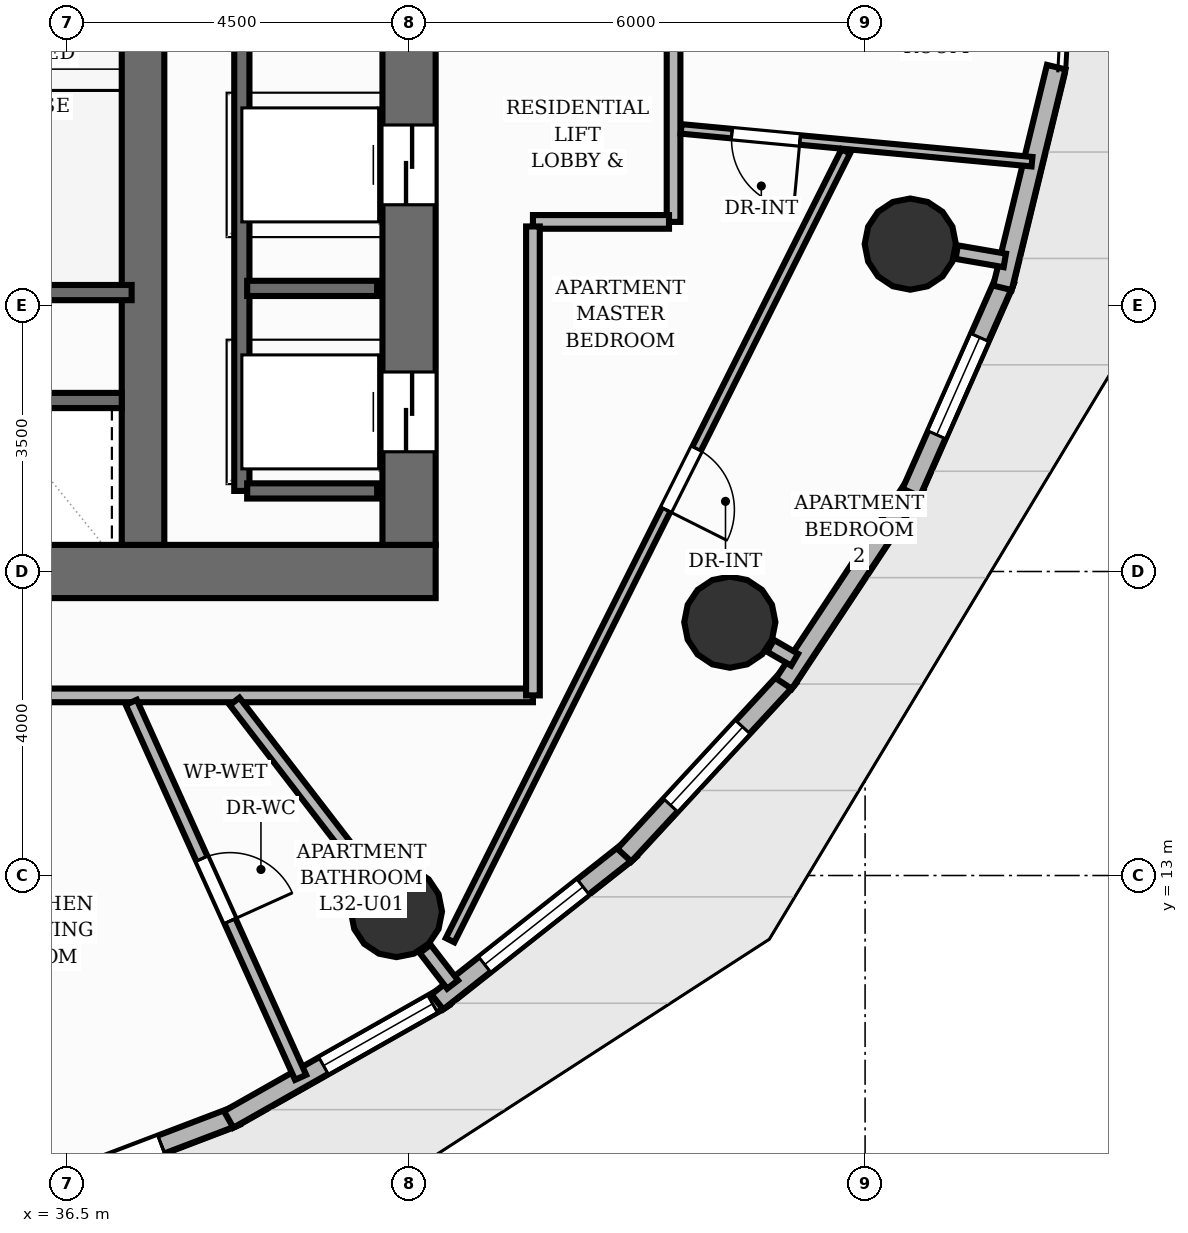
"""IFC4 building model, lengths in metres.
Left out: names, types, materials, properties, quantities, classifications, styles, units other than length and angle.
Written with IfcOpenShell. Run it as: python <this file> out.ifc"""

import sys

from ifc_helpers import new_model, si_unit, direction, frame, frame_2d, origin, origin_2d, place, context, subcontext, project, spatial, rectangle, circle, extrude, element, fill, save


model = new_model("IFC4")
c1 = context("Model", 3, precision=1e-05, world=origin(), true_north=direction((0.0, 1.0)))
c2 = subcontext(c1, "Body", "Model", "MODEL_VIEW")
j1 = project(units=[si_unit("LENGTHUNIT", "METRE"), si_unit("PLANEANGLEUNIT", "RADIAN")], contexts=[c1])
p1 = place(None, origin())
s1 = spatial("IfcSite", under=j1, at=p1, CompositionType="ELEMENT")
p2 = place(p1, origin())
s2 = spatial("IfcBuilding", under=s1, at=p2, CompositionType="ELEMENT")
p3 = place(p2, frame((0.0, 0.0, 109.28)))
s3 = spatial("IfcBuildingStorey", under=s2, at=p3, CompositionType="ELEMENT", Elevation=109.28)
p4 = place(p3, frame((22.65, 17.0, 0.0), z_axis=(0.0, 0.0, 1.0), x_axis=(1.0, 0.0, 0.0)))
e1 = element("IfcWall", 1, at=p4, inside=s3, PredefinedType="SHEAR", context=c2, shape_type="SweptSolid", body=[
    extrude(rectangle(XDim=18.7, YDim=0.7, at=frame_2d((9.35, 0.0))), origin(), (0.0, 0.0, 1.0), 3.2),
])
p5 = place(p4, frame((5.85, 0.0, 0.0)))
e2 = element("IfcOpeningElement", 2, at=p5, cuts=e1, PredefinedType="OPENING", context=c2, shape_type="SweptSolid", body=[
    extrude(rectangle(XDim=1.1, YDim=2.15, at=frame_2d((0.55, 1.075))), frame((0.0, 0.36, 0.0), z_axis=(0.0, -1.0, 0.0), x_axis=(1.0, 0.0, 0.0)), (0.0, 0.0, 1.0), 0.72),
])
p6 = place(p4, frame((9.4, 0.0, 0.0)))
e3 = element("IfcOpeningElement", 3, at=p6, cuts=e1, PredefinedType="OPENING", context=c2, shape_type="SweptSolid", body=[
    extrude(rectangle(XDim=0.9, YDim=2.0, at=frame_2d((0.45, 1.0))), frame((0.0, 0.36, 0.0), z_axis=(0.0, -1.0, 0.0), x_axis=(1.0, 0.0, 0.0)), (0.0, 0.0, 1.0), 0.72),
])
p7 = place(p3, frame((41.0, 17.35, 0.0), z_axis=(0.0, 0.0, 1.0), x_axis=(0.0, 1.0, 0.0)))
e4 = element("IfcWall", 4, at=p7, inside=s3, PredefinedType="SHEAR", context=c2, shape_type="SweptSolid", body=[
    extrude(rectangle(XDim=13.3, YDim=0.7, at=frame_2d((6.65, 0.0))), origin(), (0.0, 0.0, 1.0), 3.2),
])
p8 = place(p7, frame((1.225, 0.0, 0.0)))
e5 = element("IfcOpeningElement", 5, at=p8, cuts=e4, PredefinedType="OPENING", context=c2, shape_type="SweptSolid", body=[
    extrude(rectangle(XDim=1.05, YDim=2.0, at=frame_2d((0.525, 1.0))), frame((0.0, 0.36, 0.0), z_axis=(0.0, -1.0, 0.0), x_axis=(1.0, 0.0, 0.0)), (0.0, 0.0, 1.0), 0.72),
])
p9 = place(p7, frame((4.475, 0.0, 0.0)))
e6 = element("IfcOpeningElement", 6, at=p9, cuts=e4, PredefinedType="OPENING", context=c2, shape_type="SweptSolid", body=[
    extrude(rectangle(XDim=1.05, YDim=2.0, at=frame_2d((0.525, 1.0))), frame((0.0, 0.36, 0.0), z_axis=(0.0, -1.0, 0.0), x_axis=(1.0, 0.0, 0.0)), (0.0, 0.0, 1.0), 0.72),
])
p10 = place(p7, frame((7.775, 0.0, 0.0)))
e7 = element("IfcOpeningElement", 7, at=p10, cuts=e4, PredefinedType="OPENING", context=c2, shape_type="SweptSolid", body=[
    extrude(rectangle(XDim=1.05, YDim=2.0, at=frame_2d((0.525, 1.0))), frame((0.0, 0.36, 0.0), z_axis=(0.0, -1.0, 0.0), x_axis=(1.0, 0.0, 0.0)), (0.0, 0.0, 1.0), 0.72),
])
p11 = place(p7, frame((11.025, 0.0, 0.0)))
e8 = element("IfcOpeningElement", 8, at=p11, cuts=e4, PredefinedType="OPENING", context=c2, shape_type="SweptSolid", body=[
    extrude(rectangle(XDim=1.05, YDim=2.0, at=frame_2d((0.525, 1.0))), frame((0.0, 0.36, 0.0), z_axis=(0.0, -1.0, 0.0), x_axis=(1.0, 0.0, 0.0)), (0.0, 0.0, 1.0), 0.72),
])
p12 = place(p3, frame((37.5, 17.35, 0.0), z_axis=(0.0, 0.0, 1.0), x_axis=(0.0, 1.0, 0.0)))
e9 = element("IfcWall", 9, at=p12, inside=s3, PredefinedType="SHEAR", context=c2, shape_type="SweptSolid", body=[
    extrude(rectangle(XDim=13.3, YDim=0.56, at=frame_2d((6.65, 0.0))), origin(), (0.0, 0.0, 1.0), 3.2),
])
for number, where, z_axis, x_axis in (
    (10, (40.833, 12.526, 0.0), (0.0, 0.0, 1.0), (1.0, 0.0, 0.0)),
    (11, (45.22, 16.333, 0.0), (0.0, 0.0, 1.0), (1.0, 0.0, 0.0)),
    (12, (47.594, 21.308, 0.0), (0.0, 0.0, 1.0), (1.0, 0.0, 0.0)),
):
    element("IfcColumn", number, at=place(p3, frame(where, z_axis=z_axis, x_axis=x_axis)), inside=s3, PredefinedType="COLUMN", context=c2, shape_type="SweptSolid", body=[
        extrude(circle(Radius=0.6, at=origin_2d()), origin(), (0.0, 0.0, 1.0), 3.2),
    ])
p13 = place(p3, frame((38.725, 9.836, 0.0), z_axis=(0.0, 0.0, 1.0), x_axis=(-0.934481801939, -0.3560109013, 0.0)))
e13 = element("IfcWall", 13, at=p13, inside=s3, PredefinedType="SOLIDWALL", context=c2, shape_type="SweptSolid", body=[
    extrude(rectangle(XDim=3.26, YDim=0.25, at=frame_2d((1.63, 0.0))), origin(), (0.0, 0.0, 1.0), 2.8),
])
p14 = place(p13, frame((1.055, 0.0, 0.0)))
e14 = element("IfcOpeningElement", 14, at=p14, cuts=e13, PredefinedType="OPENING", context=c2, shape_type="SweptSolid", body=[
    extrude(rectangle(XDim=1.15, YDim=2.01, at=frame_2d((0.575, 1.005))), frame((0.0, 0.135, 0.0), z_axis=(0.0, -1.0, 0.0), x_axis=(1.0, 0.0, 0.0)), (0.0, 0.0, 1.0), 0.27),
])
p15 = place(p3, frame((41.462, 11.397, 0.0), z_axis=(0.0, 0.0, 1.0), x_axis=(-0.869984700924, -0.493078715986, 0.0)))
e15 = element("IfcWall", 15, at=p15, inside=s3, PredefinedType="SOLIDWALL", context=c2, shape_type="SweptSolid", body=[
    extrude(rectangle(XDim=3.26, YDim=0.25, at=frame_2d((1.63, 0.0))), origin(), (0.0, 0.0, 1.0), 2.8),
])
p16 = place(p15, frame((0.175, 0.0, 0.85)))
e16 = element("IfcOpeningElement", 16, at=p16, cuts=e15, PredefinedType="OPENING", context=c2, shape_type="SweptSolid", body=[
    extrude(rectangle(XDim=1.65, YDim=1.55, at=frame_2d((0.825, 0.775))), frame((0.0, 0.135, 0.0), z_axis=(0.0, -1.0, 0.0), x_axis=(1.0, 0.0, 0.0)), (0.0, 0.0, 1.0), 0.27),
])
p17 = place(p3, frame((43.912, 13.342, 0.0), z_axis=(0.0, 0.0, 1.0), x_axis=(-0.784871179145, -0.619658964389, 0.0)))
e17 = element("IfcWall", 17, at=p17, inside=s3, PredefinedType="SOLIDWALL", context=c2, shape_type="SweptSolid", body=[
    extrude(rectangle(XDim=3.236, YDim=0.25, at=frame_2d((1.618, 0.0))), origin(), (0.0, 0.0, 1.0), 2.8),
])
p18 = place(p17, frame((0.793, 0.0, 0.85)))
e18 = element("IfcOpeningElement", 18, at=p18, cuts=e17, PredefinedType="OPENING", context=c2, shape_type="SweptSolid", body=[
    extrude(rectangle(XDim=1.65, YDim=1.55, at=frame_2d((0.825, 0.775))), frame((0.0, 0.135, 0.0), z_axis=(0.0, -1.0, 0.0), x_axis=(1.0, 0.0, 0.0)), (0.0, 0.0, 1.0), 0.27),
])
p19 = place(p3, frame((45.999, 15.612, 0.0), z_axis=(0.0, 0.0, 1.0), x_axis=(-0.678956449941, -0.734178547142, 0.0)))
e19 = element("IfcWall", 19, at=p19, inside=s3, PredefinedType="SOLIDWALL", context=c2, shape_type="SweptSolid", body=[
    extrude(rectangle(XDim=3.192, YDim=0.25, at=frame_2d((1.596, 0.0))), origin(), (0.0, 0.0, 1.0), 2.8),
])
p20 = place(p19, frame((0.896, 0.0, 0.85)))
e20 = element("IfcOpeningElement", 20, at=p20, cuts=e19, PredefinedType="OPENING", context=c2, shape_type="SweptSolid", body=[
    extrude(rectangle(XDim=1.4, YDim=1.55, at=frame_2d((0.7, 0.775))), frame((0.0, 0.135, 0.0), z_axis=(0.0, -1.0, 0.0), x_axis=(1.0, 0.0, 0.0)), (0.0, 0.0, 1.0), 0.27),
])
p21 = place(p3, frame((47.659, 18.136, 0.0), z_axis=(0.0, 0.0, 1.0), x_axis=(-0.552034347266, -0.833821371421, 0.0)))
e21 = element("IfcWall", 21, at=p21, inside=s3, PredefinedType="SOLIDWALL", context=c2, shape_type="SweptSolid", body=[
    extrude(rectangle(XDim=3.131, YDim=0.25, at=frame_2d((1.565, 0.0))), origin(), (0.0, 0.0, 1.0), 2.8),
])
p22 = place(p3, frame((48.843, 20.838, 0.0), z_axis=(0.0, 0.0, 1.0), x_axis=(-0.404109525311, -0.914710605357, 0.0)))
e22 = element("IfcWall", 22, at=p22, inside=s3, PredefinedType="SOLIDWALL", context=c2, shape_type="SweptSolid", body=[
    extrude(rectangle(XDim=3.061, YDim=0.25, at=frame_2d((1.53, 0.0))), origin(), (0.0, 0.0, 1.0), 2.8),
])
p23 = place(p22, frame((0.83, 0.0, 0.85)))
e23 = element("IfcOpeningElement", 23, at=p23, cuts=e22, PredefinedType="OPENING", context=c2, shape_type="SweptSolid", body=[
    extrude(rectangle(XDim=1.4, YDim=1.55, at=frame_2d((0.7, 0.775))), frame((0.0, 0.135, 0.0), z_axis=(0.0, -1.0, 0.0), x_axis=(1.0, 0.0, 0.0)), (0.0, 0.0, 1.0), 0.27),
])
p24 = place(p3, frame((49.514, 23.636, 0.0), z_axis=(0.0, 0.0, 1.0), x_axis=(-0.236668427837, -0.971590477138, 0.0)))
e24 = element("IfcWall", 24, at=p24, inside=s3, PredefinedType="SOLIDWALL", context=c2, shape_type="SweptSolid", body=[
    extrude(rectangle(XDim=2.989, YDim=0.25, at=frame_2d((1.494, 0.0))), origin(), (0.0, 0.0, 1.0), 2.8),
])
p25 = place(p3, frame((34.11, 20.67, 0.0), z_axis=(0.0, 0.0, 1.0), x_axis=(1.0, 0.0, 0.0)))
e25 = element("IfcWall", 25, at=p25, inside=s3, PredefinedType="SHEAR", context=c2, shape_type="SweptSolid", body=[
    extrude(rectangle(XDim=3.24, YDim=0.2, at=frame_2d((1.62, 0.0))), origin(), (0.0, 0.0, 1.0), 3.2),
])
p26 = place(p3, frame((38.8, 18.06, 0.0), z_axis=(0.0, 0.0, 1.0), x_axis=(0.0, 1.0, 0.0)))
e26 = element("IfcWall", 26, at=p26, inside=s3, PredefinedType="SHEAR", context=c2, shape_type="SweptSolid", body=[
    extrude(rectangle(XDim=11.88, YDim=0.2, at=frame_2d((5.94, 0.0))), origin(), (0.0, 0.0, 1.0), 3.2),
])
for number, where, z_axis, x_axis in (
    (27, (38.87, 18.06, 0.0), (0.0, 0.0, 1.0), (1.0, 0.0, 0.0)),
    (28, (38.87, 20.725, 0.0), (0.0, 0.0, 1.0), (1.0, 0.0, 0.0)),
):
    element("IfcWall", number, at=place(p3, frame(where, z_axis=z_axis, x_axis=x_axis)), inside=s3, PredefinedType="SHEAR", context=c2, shape_type="SweptSolid", body=[
        extrude(rectangle(XDim=1.71, YDim=0.2, at=frame_2d((0.855, 0.0))), origin(), (0.0, 0.0, 1.0), 3.2),
    ])
p27 = place(p3, frame((33.5, 19.25, 0.0), z_axis=(0.0, 0.0, 1.0), x_axis=(1.0, 0.0, 0.0)))
e29 = element("IfcWall", 29, at=p27, inside=s3, PredefinedType="SHEAR", context=c2, shape_type="SweptSolid", body=[
    extrude(rectangle(XDim=3.72, YDim=0.2, at=frame_2d((1.86, 0.0))), origin(), (0.0, 0.0, 1.0), 3.2),
])
p28 = place(p3, frame((41.212, 12.034, 0.0), z_axis=(0.0, 0.0, 1.0), x_axis=(0.609790512648, -0.792562635181, 0.0)))
e30 = element("IfcWall", 30, at=p28, inside=s3, PredefinedType="PARTITIONING", context=c2, shape_type="SweptSolid", body=[
    extrude(rectangle(XDim=0.592, YDim=0.18, at=frame_2d((0.296, 0.0))), origin(), (0.0, 0.0, 1.0), 2.1),
])
p29 = place(p3, frame((45.757, 16.022, 0.0), z_axis=(0.0, 0.0, 1.0), x_axis=(0.864891917132, -0.501958137377, 0.0)))
e31 = element("IfcWall", 31, at=p29, inside=s3, PredefinedType="PARTITIONING", context=c2, shape_type="SweptSolid", body=[
    extrude(rectangle(XDim=0.365, YDim=0.18, at=frame_2d((0.183, 0.0))), origin(), (0.0, 0.0, 1.0), 2.1),
])
p30 = place(p3, frame((48.206, 21.202, 0.0), z_axis=(0.0, 0.0, 1.0), x_axis=(0.985389793052, -0.170314285219, 0.0)))
e32 = element("IfcWall", 32, at=p30, inside=s3, PredefinedType="PARTITIONING", context=c2, shape_type="SweptSolid", body=[
    extrude(rectangle(XDim=0.642, YDim=0.18, at=frame_2d((0.321, 0.0))), origin(), (0.0, 0.0, 1.0), 2.1),
])
p31 = place(p3, frame((42.63, 15.37, 0.0), z_axis=(0.0, 0.0, 1.0), x_axis=(-1.0, 0.0, 0.0)))
e33 = element("IfcWall", 33, at=p31, inside=s3, PredefinedType="PARTITIONING", context=c2, shape_type="SweptSolid", body=[
    extrude(rectangle(XDim=14.346, YDim=0.18, at=frame_2d((7.173, 0.0))), origin(), (0.0, 0.0, 1.0), 2.795),
])
p32 = place(p31, frame((6.615, 0.0, 0.0)))
e34 = element("IfcOpeningElement", 34, at=p32, cuts=e33, PredefinedType="OPENING", context=c2, shape_type="SweptSolid", body=[
    extrude(rectangle(XDim=1.05, YDim=2.15, at=frame_2d((0.525, 1.075))), frame((0.0, 0.1, 0.0), z_axis=(0.0, -1.0, 0.0), x_axis=(1.0, 0.0, 0.0)), (0.0, 0.0, 1.0), 0.2),
])
p33 = place(p3, frame((44.48, 26.34, 0.0), z_axis=(0.0, 0.0, 1.0), x_axis=(0.0, -1.0, 0.0)))
e35 = element("IfcWall", 35, at=p33, inside=s3, PredefinedType="PARTITIONING", context=c2, shape_type="SweptSolid", body=[
    extrude(rectangle(XDim=4.74, YDim=0.18, at=frame_2d((2.37, 0.0))), origin(), (0.0, 0.0, 1.0), 2.795),
])
p34 = place(p33, frame((1.239, 0.0, 0.0)))
e36 = element("IfcOpeningElement", 36, at=p34, cuts=e35, PredefinedType="OPENING", context=c2, shape_type="SweptSolid", body=[
    extrude(rectangle(XDim=1.05, YDim=2.15, at=frame_2d((0.525, 1.075))), frame((0.0, 0.1, 0.0), z_axis=(0.0, -1.0, 0.0), x_axis=(1.0, 0.0, 0.0)), (0.0, 0.0, 1.0), 0.2),
])
p35 = place(p3, frame((44.42, 21.6, 0.0), z_axis=(0.0, 0.0, 1.0), x_axis=(-1.0, 0.0, 0.0)))
e37 = element("IfcWall", 37, at=p35, inside=s3, PredefinedType="PARTITIONING", context=c2, shape_type="SweptSolid", body=[
    extrude(rectangle(XDim=1.79, YDim=0.18, at=frame_2d((0.895, 0.0))), origin(), (0.0, 0.0, 1.0), 2.1),
])
p36 = place(p3, frame((42.63, 21.54, 0.0), z_axis=(0.0, 0.0, 1.0), x_axis=(0.0, -1.0, 0.0)))
e38 = element("IfcWall", 38, at=p36, inside=s3, PredefinedType="PARTITIONING", context=c2, shape_type="SweptSolid", body=[
    extrude(rectangle(XDim=6.17, YDim=0.18, at=frame_2d((3.085, 0.0))), origin(), (0.0, 0.0, 1.0), 2.795),
])
p37 = place(p3, frame((37.345, 15.279, 0.0), z_axis=(0.0, 0.0, 1.0), x_axis=(0.411532357021, -0.911395149825, 0.0)))
e39 = element("IfcWall", 39, at=p37, inside=s3, PredefinedType="PLUMBINGWALL", context=c2, shape_type="SweptSolid", body=[
    extrude(rectangle(XDim=5.415, YDim=0.16, at=frame_2d((2.707, 0.0))), origin(), (0.0, 0.0, 1.0), 2.481),
])
p38 = place(p37, frame((2.257, 0.0, 0.0)))
e40 = element("IfcOpeningElement", 40, at=p38, cuts=e39, PredefinedType="OPENING", context=c2, shape_type="SweptSolid", body=[
    extrude(rectangle(XDim=0.9, YDim=2.1, at=frame_2d((0.45, 1.05))), frame((0.0, 0.09, 0.0), z_axis=(0.0, -1.0, 0.0), x_axis=(1.0, 0.0, 0.0)), (0.0, 0.0, 1.0), 0.18),
])
p39 = place(p3, frame((38.705, 15.291, 0.0), z_axis=(0.0, 0.0, 1.0), x_axis=(0.610033601295, -0.792375545617, 0.0)))
e41 = element("IfcWall", 41, at=p39, inside=s3, PredefinedType="PLUMBINGWALL", context=c2, shape_type="SweptSolid", body=[
    extrude(rectangle(XDim=2.887, YDim=0.16, at=frame_2d((1.443, 0.0))), origin(), (0.0, 0.0, 1.0), 2.1),
])
p40 = place(p3, frame((49.196, 22.392, 0.0), z_axis=(0.0, 0.0, 1.0), x_axis=(-0.99565683003, 0.09309928472, 0.0)))
e42 = element("IfcWall", 42, at=p40, inside=s3, PredefinedType="PARTITIONING", context=c2, shape_type="SweptSolid", body=[
    extrude(rectangle(XDim=4.636, YDim=0.125, at=frame_2d((2.318, 0.0))), origin(), (0.0, 0.0, 1.0), 2.795),
])
p41 = place(p40, frame((3.066, 0.0, 0.0)))
e43 = element("IfcOpeningElement", 43, at=p41, cuts=e42, PredefinedType="OPENING", context=c2, shape_type="SweptSolid", body=[
    extrude(rectangle(XDim=0.9, YDim=2.1, at=frame_2d((0.45, 1.05))), frame((0.0, 0.073, 0.0), z_axis=(0.0, -1.0, 0.0), x_axis=(1.0, 0.0, 0.0)), (0.0, 0.0, 1.0), 0.145),
])
p42 = place(p3, frame((46.746, 22.528, 0.0), z_axis=(0.0, 0.0, 1.0), x_axis=(-0.448357094434, -0.893854527242, 0.0)))
e44 = element("IfcWall", 44, at=p42, inside=s3, PredefinedType="PARTITIONING", context=c2, shape_type="SweptSolid", body=[
    extrude(rectangle(XDim=11.611, YDim=0.125, at=frame_2d((5.805, 0.0))), origin(), (0.0, 0.0, 1.0), 2.243),
])
p43 = place(p42, frame((4.375, 0.0, 0.0)))
e45 = element("IfcOpeningElement", 45, at=p43, cuts=e44, PredefinedType="OPENING", context=c2, shape_type="SweptSolid", body=[
    extrude(rectangle(XDim=0.9, YDim=2.1, at=frame_2d((0.45, 1.05))), frame((0.0, 0.073, 0.0), z_axis=(0.0, -1.0, 0.0), x_axis=(1.0, 0.0, 0.0)), (0.0, 0.0, 1.0), 0.145),
])
p44 = place(p14, origin())
e46 = element("IfcDoor", 46, at=p44, inside=s3, OperationType="SINGLE_SWING_LEFT", PredefinedType="DOOR", context=c2, shape_type="SweptSolid", body=[
    extrude(rectangle(XDim=1.15, YDim=2.01, at=frame_2d((0.575, 1.005))), frame((0.0, 0.025, 0.0), z_axis=(0.0, -1.0, 0.0), x_axis=(1.0, 0.0, 0.0)), (0.0, 0.0, 1.0), 0.05),
])
fill(e14, e46)
p45 = place(p16, origin())
e47 = element("IfcWindow", 47, at=p45, inside=s3, PartitioningType="SINGLE_PANEL", PredefinedType="WINDOW", context=c2, shape_type="SweptSolid", body=[
    extrude(rectangle(XDim=1.65, YDim=1.55, at=frame_2d((0.825, 0.775))), frame((0.0, 0.03, 0.0), z_axis=(0.0, -1.0, 0.0), x_axis=(1.0, 0.0, 0.0)), (0.0, 0.0, 1.0), 0.06),
])
fill(e16, e47)
p46 = place(p18, origin())
e48 = element("IfcWindow", 48, at=p46, inside=s3, PartitioningType="SINGLE_PANEL", PredefinedType="WINDOW", context=c2, shape_type="SweptSolid", body=[
    extrude(rectangle(XDim=1.65, YDim=1.55, at=frame_2d((0.825, 0.775))), frame((0.0, 0.03, 0.0), z_axis=(0.0, -1.0, 0.0), x_axis=(1.0, 0.0, 0.0)), (0.0, 0.0, 1.0), 0.06),
])
fill(e18, e48)
p47 = place(p20, origin())
e49 = element("IfcWindow", 49, at=p47, inside=s3, PartitioningType="SINGLE_PANEL", PredefinedType="WINDOW", context=c2, shape_type="SweptSolid", body=[
    extrude(rectangle(XDim=1.4, YDim=1.55, at=frame_2d((0.7, 0.775))), frame((0.0, 0.03, 0.0), z_axis=(0.0, -1.0, 0.0), x_axis=(1.0, 0.0, 0.0)), (0.0, 0.0, 1.0), 0.06),
])
fill(e20, e49)
p48 = place(p23, origin())
e50 = element("IfcWindow", 50, at=p48, inside=s3, PartitioningType="SINGLE_PANEL", PredefinedType="WINDOW", context=c2, shape_type="SweptSolid", body=[
    extrude(rectangle(XDim=1.4, YDim=1.55, at=frame_2d((0.7, 0.775))), frame((0.0, 0.03, 0.0), z_axis=(0.0, -1.0, 0.0), x_axis=(1.0, 0.0, 0.0)), (0.0, 0.0, 1.0), 0.06),
])
fill(e23, e50)
p49 = place(p8, origin())
e51 = element("IfcDoor", 51, at=p49, inside=s3, OperationType="DOUBLE_DOOR_SLIDING", PredefinedType="DOOR", context=c2, shape_type="SweptSolid", body=[
    extrude(rectangle(XDim=1.05, YDim=2.0, at=frame_2d((0.525, 1.0))), frame((0.0, 0.025, 0.0), z_axis=(0.0, -1.0, 0.0), x_axis=(1.0, 0.0, 0.0)), (0.0, 0.0, 1.0), 0.05),
])
fill(e5, e51)
p50 = place(p9, origin())
e52 = element("IfcDoor", 52, at=p50, inside=s3, OperationType="DOUBLE_DOOR_SLIDING", PredefinedType="DOOR", context=c2, shape_type="SweptSolid", body=[
    extrude(rectangle(XDim=1.05, YDim=2.0, at=frame_2d((0.525, 1.0))), frame((0.0, 0.025, 0.0), z_axis=(0.0, -1.0, 0.0), x_axis=(1.0, 0.0, 0.0)), (0.0, 0.0, 1.0), 0.05),
])
fill(e6, e52)
p51 = place(p38, origin())
e53 = element("IfcDoor", 53, at=p51, inside=s3, OperationType="SINGLE_SWING_RIGHT", PredefinedType="DOOR", context=c2, shape_type="SweptSolid", body=[
    extrude(rectangle(XDim=0.9, YDim=2.1, at=frame_2d((0.45, 1.05))), frame((0.0, 0.025, 0.0), z_axis=(0.0, -1.0, 0.0), x_axis=(1.0, 0.0, 0.0)), (0.0, 0.0, 1.0), 0.05),
])
fill(e40, e53)
p52 = place(p41, origin())
e54 = element("IfcDoor", 54, at=p52, inside=s3, OperationType="SINGLE_SWING_LEFT", PredefinedType="DOOR", context=c2, shape_type="SweptSolid", body=[
    extrude(rectangle(XDim=0.9, YDim=2.1, at=frame_2d((0.45, 1.05))), frame((0.0, 0.025, 0.0), z_axis=(0.0, -1.0, 0.0), x_axis=(1.0, 0.0, 0.0)), (0.0, 0.0, 1.0), 0.05),
])
fill(e43, e54)
p53 = place(p43, origin())
e55 = element("IfcDoor", 55, at=p53, inside=s3, OperationType="SINGLE_SWING_RIGHT", PredefinedType="DOOR", context=c2, shape_type="SweptSolid", body=[
    extrude(rectangle(XDim=0.9, YDim=2.1, at=frame_2d((0.45, 1.05))), frame((0.0, 0.025, 0.0), z_axis=(0.0, -1.0, 0.0), x_axis=(1.0, 0.0, 0.0)), (0.0, 0.0, 1.0), 0.05),
])
fill(e45, e55)
save(model, sys.argv[1])
